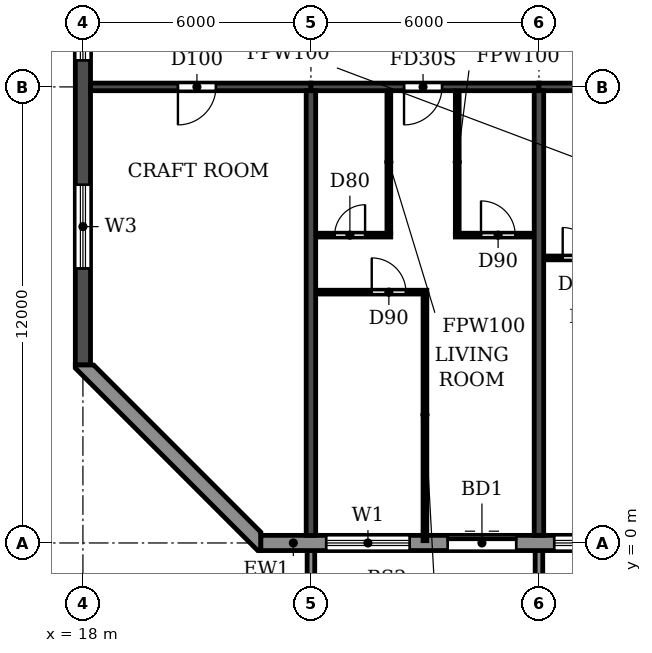
"""IFC4 building model, lengths in metres.
Left out: names, types, materials, properties, quantities, classifications, styles, units other than length and angle.
Written with IfcOpenShell. Run it as: python <this file> out.ifc"""

import sys

from ifc_helpers import new_model, si_unit, direction, frame, frame_2d, origin, place, context, subcontext, project, spatial, polyline, rectangle, outline, extrude, source, transform, mapped, element, fill, save


model = new_model("IFC4")
c1 = context("Model", 3, precision=1e-05, world=origin(), true_north=direction((0.0, 1.0)))
c2 = subcontext(c1, "Body", "Model", "MODEL_VIEW")
j1 = project(units=[si_unit("LENGTHUNIT", "METRE"), si_unit("PLANEANGLEUNIT", "RADIAN")], contexts=[c1])
p1 = place(None, origin())
s1 = spatial("IfcSite", under=j1, at=p1, CompositionType="ELEMENT")
p2 = place(p1, origin())
s2 = spatial("IfcBuilding", under=s1, at=p2, CompositionType="ELEMENT")
p3 = place(p2, frame((0.0, 0.0, 221.4)))
s3 = spatial("IfcBuildingStorey", under=s2, at=p3, CompositionType="ELEMENT", Elevation=221.4)
for number, where, z_axis, x_axis in (
    (1, (24.0, 0.2, 0.0), (0.0, 0.0, 1.0), (0.0, 1.0, 0.0)),
    (2, (30.0, 0.2, 0.0), (0.0, 0.0, 1.0), (0.0, 1.0, 0.0)),
):
    element("IfcWall", number, at=place(p3, frame(where, z_axis=z_axis, x_axis=x_axis)), inside=s3, PredefinedType="SHEAR", context=c2, shape_type="SweptSolid", body=[
        extrude(rectangle(XDim=11.7, YDim=0.25, at=frame_2d((5.85, 0.0))), origin(), (0.0, 0.0, 1.0), 3.08),
    ])
p4 = place(p3, frame((18.0, 4.683, 0.0), z_axis=(0.0, 0.0, 1.0), x_axis=(0.0, 1.0, 0.0)))
e3 = element("IfcWall", 3, at=p4, inside=s3, PredefinedType="SHEAR", context=c2, shape_type="SweptSolid", body=[
    extrude(rectangle(XDim=31.834, YDim=0.4, at=frame_2d((15.917, 0.0))), origin(), (0.0, 0.0, 1.0), 3.08),
])
p5 = place(p4, frame((23.817, 0.0, 0.9)))
e4 = element("IfcOpeningElement", 4, at=p5, cuts=e3, PredefinedType="OPENING", context=c2, shape_type="SweptSolid", body=[
    extrude(rectangle(XDim=1.2, YDim=1.5, at=frame_2d((0.6, 0.75))), frame((0.0, 0.21, 0.0), z_axis=(0.0, -1.0, 0.0), x_axis=(1.0, 0.0, 0.0)), (0.0, 0.0, 1.0), 0.42),
])
p6 = place(p4, frame((8.017, 0.0, 0.9)))
e5 = element("IfcOpeningElement", 5, at=p6, cuts=e3, PredefinedType="OPENING", context=c2, shape_type="SweptSolid", body=[
    extrude(rectangle(XDim=1.2, YDim=1.5, at=frame_2d((0.6, 0.75))), frame((0.0, 0.21, 0.0), z_axis=(0.0, -1.0, 0.0), x_axis=(1.0, 0.0, 0.0)), (0.0, 0.0, 1.0), 0.42),
])
p7 = place(p4, frame((27.694, 0.0, 0.6)))
e6 = element("IfcOpeningElement", 6, at=p7, cuts=e3, PredefinedType="OPENING", context=c2, shape_type="SweptSolid", body=[
    extrude(rectangle(XDim=2.2, YDim=1.8, at=frame_2d((1.1, 0.9))), frame((0.0, 0.21, 0.0), z_axis=(0.0, -1.0, 0.0), x_axis=(1.0, 0.0, 0.0)), (0.0, 0.0, 1.0), 0.42),
])
p8 = place(p4, frame((2.541, 0.0, 0.6)))
e7 = element("IfcOpeningElement", 7, at=p8, cuts=e3, PredefinedType="OPENING", context=c2, shape_type="SweptSolid", body=[
    extrude(rectangle(XDim=2.2, YDim=1.8, at=frame_2d((1.1, 0.9))), frame((0.0, 0.21, 0.0), z_axis=(0.0, -1.0, 0.0), x_axis=(1.0, 0.0, 0.0)), (0.0, 0.0, 1.0), 0.42),
])
p9 = place(p4, frame((15.917, 0.0, 0.9)))
e8 = element("IfcOpeningElement", 8, at=p9, cuts=e3, PredefinedType="OPENING", context=c2, shape_type="SweptSolid", body=[
    extrude(rectangle(XDim=1.2, YDim=1.5, at=frame_2d((0.6, 0.75))), frame((0.0, 0.21, 0.0), z_axis=(0.0, -1.0, 0.0), x_axis=(1.0, 0.0, 0.0)), (0.0, 0.0, 1.0), 0.42),
])
p10 = place(p3, frame((18.2, 12.0, 0.0), z_axis=(0.0, 0.0, 1.0), x_axis=(1.0, 0.0, 0.0)))
e9 = element("IfcWall", 9, at=p10, inside=s3, PredefinedType="SHEAR", context=c2, shape_type="SweptSolid", body=[
    extrude(rectangle(XDim=5.8, YDim=0.2, at=frame_2d((2.9, 0.0))), origin(), (0.0, 0.0, 1.0), 2.48),
])
p11 = place(p10, frame((2.3, 0.0, 0.0)))
e10 = element("IfcOpeningElement", 10, at=p11, cuts=e9, PredefinedType="OPENING", context=c2, shape_type="SweptSolid", body=[
    extrude(rectangle(XDim=1.0, YDim=2.1, at=frame_2d((0.5, 1.05))), frame((0.0, 0.11, 0.0), z_axis=(0.0, -1.0, 0.0), x_axis=(1.0, 0.0, 0.0)), (0.0, 0.0, 1.0), 0.22),
])
p12 = place(p3, frame((24.0, 12.0, 0.0), z_axis=(0.0, 0.0, 1.0), x_axis=(1.0, 0.0, 0.0)))
e11 = element("IfcWall", 11, at=p12, inside=s3, PredefinedType="SHEAR", context=c2, shape_type="SweptSolid", body=[
    extrude(rectangle(XDim=6.0, YDim=0.2, at=frame_2d((3.0, 0.0))), origin(), (0.0, 0.0, 1.0), 2.48),
])
p13 = place(p12, frame((2.45, 0.0, 0.0)))
e12 = element("IfcOpeningElement", 12, at=p13, cuts=e11, PredefinedType="OPENING", context=c2, shape_type="SweptSolid", body=[
    extrude(rectangle(XDim=1.0, YDim=2.1, at=frame_2d((0.5, 1.05))), frame((0.0, 0.11, 0.0), z_axis=(0.0, -1.0, 0.0), x_axis=(1.0, 0.0, 0.0)), (0.0, 0.0, 1.0), 0.22),
])
p14 = place(p3, frame((30.0, 12.0, 0.0), z_axis=(0.0, 0.0, 1.0), x_axis=(1.0, 0.0, 0.0)))
e13 = element("IfcWall", 13, at=p14, inside=s3, PredefinedType="SHEAR", context=c2, shape_type="SweptSolid", body=[
    extrude(rectangle(XDim=6.0, YDim=0.2, at=frame_2d((3.0, 0.0))), origin(), (0.0, 0.0, 1.0), 2.48),
])
p15 = place(p14, frame((2.45, 0.0, 0.0)))
e14 = element("IfcOpeningElement", 14, at=p15, cuts=e13, PredefinedType="OPENING", context=c2, shape_type="SweptSolid", body=[
    extrude(rectangle(XDim=1.0, YDim=2.1, at=frame_2d((0.5, 1.05))), frame((0.0, 0.11, 0.0), z_axis=(0.0, -1.0, 0.0), x_axis=(1.0, 0.0, 0.0)), (0.0, 0.0, 1.0), 0.22),
])
p16 = place(p3, frame((22.683, 0.0, 0.0), z_axis=(0.0, 0.0, 1.0), x_axis=(1.0, 0.0, 0.0)))
e15 = element("IfcWall", 15, at=p16, inside=s3, PredefinedType="STANDARD", context=c2, shape_type="SweptSolid", body=[
    extrude(rectangle(XDim=56.634, YDim=0.4, at=frame_2d((28.317, 0.0))), origin(), (0.0, 0.0, 1.0), 3.08),
])
p17 = place(p16, frame((1.717, 0.0, 0.9)))
e16 = element("IfcOpeningElement", 16, at=p17, cuts=e15, PredefinedType="OPENING", context=c2, shape_type="SweptSolid", body=[
    extrude(rectangle(XDim=2.2, YDim=1.5, at=frame_2d((1.1, 0.75))), frame((0.0, 0.21, 0.0), z_axis=(0.0, -1.0, 0.0), x_axis=(1.0, 0.0, 0.0)), (0.0, 0.0, 1.0), 0.42),
])
p18 = place(p16, frame((4.917, 0.0, 0.0)))
e17 = element("IfcOpeningElement", 17, at=p18, cuts=e15, PredefinedType="OPENING", context=c2, shape_type="SweptSolid", body=[
    extrude(rectangle(XDim=1.8, YDim=2.4, at=frame_2d((0.9, 1.2))), frame((0.0, 0.21, 0.0), z_axis=(0.0, -1.0, 0.0), x_axis=(1.0, 0.0, 0.0)), (0.0, 0.0, 1.0), 0.42),
])
p19 = place(p16, frame((7.717, 0.0, 0.9)))
e18 = element("IfcOpeningElement", 18, at=p19, cuts=e15, PredefinedType="OPENING", context=c2, shape_type="SweptSolid", body=[
    extrude(rectangle(XDim=2.2, YDim=1.5, at=frame_2d((1.1, 0.75))), frame((0.0, 0.21, 0.0), z_axis=(0.0, -1.0, 0.0), x_axis=(1.0, 0.0, 0.0)), (0.0, 0.0, 1.0), 0.42),
])
p20 = place(p16, frame((10.717, 0.0, 0.9)))
e19 = element("IfcOpeningElement", 19, at=p20, cuts=e15, PredefinedType="OPENING", context=c2, shape_type="SweptSolid", body=[
    extrude(rectangle(XDim=2.2, YDim=1.5, at=frame_2d((1.1, 0.75))), frame((0.0, 0.21, 0.0), z_axis=(0.0, -1.0, 0.0), x_axis=(1.0, 0.0, 0.0)), (0.0, 0.0, 1.0), 0.42),
])
p21 = place(p16, frame((13.717, 0.0, 0.9)))
e20 = element("IfcOpeningElement", 20, at=p21, cuts=e15, PredefinedType="OPENING", context=c2, shape_type="SweptSolid", body=[
    extrude(rectangle(XDim=2.2, YDim=1.5, at=frame_2d((1.1, 0.75))), frame((0.0, 0.21, 0.0), z_axis=(0.0, -1.0, 0.0), x_axis=(1.0, 0.0, 0.0)), (0.0, 0.0, 1.0), 0.42),
])
p22 = place(p16, frame((16.917, 0.0, 0.0)))
e21 = element("IfcOpeningElement", 21, at=p22, cuts=e15, PredefinedType="OPENING", context=c2, shape_type="SweptSolid", body=[
    extrude(rectangle(XDim=1.8, YDim=2.4, at=frame_2d((0.9, 1.2))), frame((0.0, 0.21, 0.0), z_axis=(0.0, -1.0, 0.0), x_axis=(1.0, 0.0, 0.0)), (0.0, 0.0, 1.0), 0.42),
])
p23 = place(p16, frame((19.717, 0.0, 0.9)))
e22 = element("IfcOpeningElement", 22, at=p23, cuts=e15, PredefinedType="OPENING", context=c2, shape_type="SweptSolid", body=[
    extrude(rectangle(XDim=2.2, YDim=1.5, at=frame_2d((1.1, 0.75))), frame((0.0, 0.21, 0.0), z_axis=(0.0, -1.0, 0.0), x_axis=(1.0, 0.0, 0.0)), (0.0, 0.0, 1.0), 0.42),
])
p24 = place(p16, frame((22.717, 0.0, 0.9)))
e23 = element("IfcOpeningElement", 23, at=p24, cuts=e15, PredefinedType="OPENING", context=c2, shape_type="SweptSolid", body=[
    extrude(rectangle(XDim=2.2, YDim=1.5, at=frame_2d((1.1, 0.75))), frame((0.0, 0.21, 0.0), z_axis=(0.0, -1.0, 0.0), x_axis=(1.0, 0.0, 0.0)), (0.0, 0.0, 1.0), 0.42),
])
p25 = place(p16, frame((25.917, 0.0, 0.0)))
e24 = element("IfcOpeningElement", 24, at=p25, cuts=e15, PredefinedType="OPENING", context=c2, shape_type="SweptSolid", body=[
    extrude(rectangle(XDim=1.8, YDim=2.4, at=frame_2d((0.9, 1.2))), frame((0.0, 0.21, 0.0), z_axis=(0.0, -1.0, 0.0), x_axis=(1.0, 0.0, 0.0)), (0.0, 0.0, 1.0), 0.42),
])
p26 = place(p16, frame((28.717, 0.0, 0.9)))
e25 = element("IfcOpeningElement", 25, at=p26, cuts=e15, PredefinedType="OPENING", context=c2, shape_type="SweptSolid", body=[
    extrude(rectangle(XDim=2.2, YDim=1.5, at=frame_2d((1.1, 0.75))), frame((0.0, 0.21, 0.0), z_axis=(0.0, -1.0, 0.0), x_axis=(1.0, 0.0, 0.0)), (0.0, 0.0, 1.0), 0.42),
])
p27 = place(p16, frame((31.717, 0.0, 0.9)))
e26 = element("IfcOpeningElement", 26, at=p27, cuts=e15, PredefinedType="OPENING", context=c2, shape_type="SweptSolid", body=[
    extrude(rectangle(XDim=2.2, YDim=1.5, at=frame_2d((1.1, 0.75))), frame((0.0, 0.21, 0.0), z_axis=(0.0, -1.0, 0.0), x_axis=(1.0, 0.0, 0.0)), (0.0, 0.0, 1.0), 0.42),
])
p28 = place(p16, frame((34.717, 0.0, 0.9)))
e27 = element("IfcOpeningElement", 27, at=p28, cuts=e15, PredefinedType="OPENING", context=c2, shape_type="SweptSolid", body=[
    extrude(rectangle(XDim=2.2, YDim=1.5, at=frame_2d((1.1, 0.75))), frame((0.0, 0.21, 0.0), z_axis=(0.0, -1.0, 0.0), x_axis=(1.0, 0.0, 0.0)), (0.0, 0.0, 1.0), 0.42),
])
p29 = place(p16, frame((37.917, 0.0, 0.0)))
e28 = element("IfcOpeningElement", 28, at=p29, cuts=e15, PredefinedType="OPENING", context=c2, shape_type="SweptSolid", body=[
    extrude(rectangle(XDim=1.8, YDim=2.4, at=frame_2d((0.9, 1.2))), frame((0.0, 0.21, 0.0), z_axis=(0.0, -1.0, 0.0), x_axis=(1.0, 0.0, 0.0)), (0.0, 0.0, 1.0), 0.42),
])
p30 = place(p16, frame((40.717, 0.0, 0.9)))
e29 = element("IfcOpeningElement", 29, at=p30, cuts=e15, PredefinedType="OPENING", context=c2, shape_type="SweptSolid", body=[
    extrude(rectangle(XDim=2.2, YDim=1.5, at=frame_2d((1.1, 0.75))), frame((0.0, 0.21, 0.0), z_axis=(0.0, -1.0, 0.0), x_axis=(1.0, 0.0, 0.0)), (0.0, 0.0, 1.0), 0.42),
])
p31 = place(p16, frame((43.717, 0.0, 0.9)))
e30 = element("IfcOpeningElement", 30, at=p31, cuts=e15, PredefinedType="OPENING", context=c2, shape_type="SweptSolid", body=[
    extrude(rectangle(XDim=2.2, YDim=1.5, at=frame_2d((1.1, 0.75))), frame((0.0, 0.21, 0.0), z_axis=(0.0, -1.0, 0.0), x_axis=(1.0, 0.0, 0.0)), (0.0, 0.0, 1.0), 0.42),
])
p32 = place(p16, frame((46.717, 0.0, 0.9)))
e31 = element("IfcOpeningElement", 31, at=p32, cuts=e15, PredefinedType="OPENING", context=c2, shape_type="SweptSolid", body=[
    extrude(rectangle(XDim=2.2, YDim=1.5, at=frame_2d((1.1, 0.75))), frame((0.0, 0.21, 0.0), z_axis=(0.0, -1.0, 0.0), x_axis=(1.0, 0.0, 0.0)), (0.0, 0.0, 1.0), 0.42),
])
p33 = place(p16, frame((49.917, 0.0, 0.0)))
e32 = element("IfcOpeningElement", 32, at=p33, cuts=e15, PredefinedType="OPENING", context=c2, shape_type="SweptSolid", body=[
    extrude(rectangle(XDim=1.8, YDim=2.4, at=frame_2d((0.9, 1.2))), frame((0.0, 0.21, 0.0), z_axis=(0.0, -1.0, 0.0), x_axis=(1.0, 0.0, 0.0)), (0.0, 0.0, 1.0), 0.42),
])
p34 = place(p16, frame((52.717, 0.0, 0.9)))
e33 = element("IfcOpeningElement", 33, at=p34, cuts=e15, PredefinedType="OPENING", context=c2, shape_type="SweptSolid", body=[
    extrude(rectangle(XDim=2.2, YDim=1.5, at=frame_2d((1.1, 0.75))), frame((0.0, 0.21, 0.0), z_axis=(0.0, -1.0, 0.0), x_axis=(1.0, 0.0, 0.0)), (0.0, 0.0, 1.0), 0.42),
])
p35 = place(p3, origin())
e34 = element("IfcWall", 34, at=p35, inside=s3, PredefinedType="STANDARD", context=c2, shape_type="SweptSolid", body=[
    extrude(outline(polyline([(17.8, 4.683), (17.8, 4.6), (22.6, -0.2), (22.683, -0.2), (22.683, 0.283), (18.283, 4.683), (17.8, 4.683)])), origin(), (0.0, 0.0, 1.0), 3.08),
])
m1 = source(origin(), c2, "Body", "SweptSolid", [
    extrude(outline(polyline([(0.0, 0.0), (0.2, 0.0), (0.2, 1.65), (0.0, 1.65), (0.0, 0.0)])), origin(), (0.0, 0.0, 1.0), 3.1),
])
for number, where in (
    (35, (23.9, -1.85, 0.0)),
    (36, (29.9, -1.85, 0.0)),
):
    element("IfcWall", number, at=place(p3, frame(where)), inside=s3, PredefinedType="STANDARD", context=c2, shape_type="MappedRepresentation", body=[
        mapped(m1, transform((0.0, 0.0, 0.0))),
    ])
p36 = place(p3, frame((24.135, 6.6, 0.0), z_axis=(0.0, 0.0, 1.0), x_axis=(1.0, 0.0, 0.0)))
e37 = element("IfcWall", 37, at=p36, inside=s3, PredefinedType="PARTITIONING", context=c2, shape_type="SweptSolid", body=[
    extrude(rectangle(XDim=2.915, YDim=0.1, at=frame_2d((1.458, 0.0))), origin(), (0.0, 0.0, 1.0), 3.08),
])
p37 = place(p36, frame((1.465, 0.0, 0.0)))
e38 = element("IfcOpeningElement", 38, at=p37, cuts=e37, PredefinedType="OPENING", context=c2, shape_type="SweptSolid", body=[
    extrude(rectangle(XDim=0.9, YDim=2.1, at=frame_2d((0.45, 1.05))), frame((0.0, 0.06, 0.0), z_axis=(0.0, -1.0, 0.0), x_axis=(1.0, 0.0, 0.0)), (0.0, 0.0, 1.0), 0.12),
])
p38 = place(p3, frame((30.135, 7.5, 0.0), z_axis=(0.0, 0.0, 1.0), x_axis=(1.0, 0.0, 0.0)))
e39 = element("IfcWall", 39, at=p38, inside=s3, PredefinedType="PARTITIONING", context=c2, shape_type="SweptSolid", body=[
    extrude(rectangle(XDim=1.965, YDim=0.1, at=frame_2d((0.982, 0.0))), origin(), (0.0, 0.0, 1.0), 3.08),
])
p39 = place(p38, frame((0.49, 0.0, 0.0)))
e40 = element("IfcOpeningElement", 40, at=p39, cuts=e39, PredefinedType="OPENING", context=c2, shape_type="SweptSolid", body=[
    extrude(rectangle(XDim=0.8, YDim=2.1, at=frame_2d((0.4, 1.05))), frame((0.0, 0.06, 0.0), z_axis=(0.0, -1.0, 0.0), x_axis=(1.0, 0.0, 0.0)), (0.0, 0.0, 1.0), 0.12),
])
p40 = place(p3, frame((24.135, 8.1, 0.0), z_axis=(0.0, 0.0, 1.0), x_axis=(1.0, 0.0, 0.0)))
e41 = element("IfcWall", 41, at=p40, inside=s3, PredefinedType="PARTITIONING", context=c2, shape_type="SweptSolid", body=[
    extrude(rectangle(XDim=1.965, YDim=0.1, at=frame_2d((0.982, 0.0))), origin(), (0.0, 0.0, 1.0), 3.08),
])
p41 = place(p40, frame((0.49, 0.0, 0.0)))
e42 = element("IfcOpeningElement", 42, at=p41, cuts=e41, PredefinedType="OPENING", context=c2, shape_type="SweptSolid", body=[
    extrude(rectangle(XDim=0.8, YDim=2.1, at=frame_2d((0.4, 1.05))), frame((0.0, 0.06, 0.0), z_axis=(0.0, -1.0, 0.0), x_axis=(1.0, 0.0, 0.0)), (0.0, 0.0, 1.0), 0.12),
])
p42 = place(p3, frame((27.8, 8.1, 0.0), z_axis=(0.0, 0.0, 1.0), x_axis=(1.0, 0.0, 0.0)))
e43 = element("IfcWall", 43, at=p42, inside=s3, PredefinedType="PARTITIONING", context=c2, shape_type="SweptSolid", body=[
    extrude(rectangle(XDim=2.065, YDim=0.1, at=frame_2d((1.032, 0.0))), origin(), (0.0, 0.0, 1.0), 3.08),
])
p43 = place(p42, frame((0.675, 0.0, 0.0)))
e44 = element("IfcOpeningElement", 44, at=p43, cuts=e43, PredefinedType="OPENING", context=c2, shape_type="SweptSolid", body=[
    extrude(rectangle(XDim=0.9, YDim=2.1, at=frame_2d((0.45, 1.05))), frame((0.0, 0.06, 0.0), z_axis=(0.0, -1.0, 0.0), x_axis=(1.0, 0.0, 0.0)), (0.0, 0.0, 1.0), 0.12),
])
p44 = place(p3, frame((26.05, 8.15, 0.0), z_axis=(0.0, 0.0, 1.0), x_axis=(0.0, 1.0, 0.0)))
e45 = element("IfcWall", 45, at=p44, inside=s3, PredefinedType="PARTITIONING", context=c2, shape_type="SweptSolid", body=[
    extrude(rectangle(XDim=3.74, YDim=0.1, at=frame_2d((1.87, 0.0))), origin(), (0.0, 0.0, 1.0), 3.08),
])
p45 = place(p3, frame((27.0, 0.06, 0.0), z_axis=(0.0, 0.0, 1.0), x_axis=(0.0, 1.0, 0.0)))
e46 = element("IfcWall", 46, at=p45, inside=s3, PredefinedType="PARTITIONING", context=c2, shape_type="SweptSolid", body=[
    extrude(rectangle(XDim=6.49, YDim=0.1, at=frame_2d((3.245, 0.0))), origin(), (0.0, 0.0, 1.0), 3.08),
])
p46 = place(p3, frame((27.85, 8.15, 0.0), z_axis=(0.0, 0.0, 1.0), x_axis=(0.0, 1.0, 0.0)))
e47 = element("IfcWall", 47, at=p46, inside=s3, PredefinedType="PARTITIONING", context=c2, shape_type="SweptSolid", body=[
    extrude(rectangle(XDim=3.74, YDim=0.1, at=frame_2d((1.87, 0.0))), origin(), (0.0, 0.0, 1.0), 3.08),
])
p47 = place(p17, origin())
e48 = element("IfcWindow", 48, at=p47, inside=s3, PartitioningType="DOUBLE_PANEL_HORIZONTAL", PredefinedType="WINDOW", context=c2, shape_type="SweptSolid", body=[
    extrude(rectangle(XDim=2.2, YDim=1.5, at=frame_2d((1.1, 0.75))), frame((0.0, 0.03, 0.0), z_axis=(0.0, -1.0, 0.0), x_axis=(1.0, 0.0, 0.0)), (0.0, 0.0, 1.0), 0.06),
])
fill(e16, e48)
p48 = place(p18, origin())
e49 = element("IfcDoor", 49, at=p48, inside=s3, OperationType="DOUBLE_DOOR_SLIDING", PredefinedType="DOOR", context=c2, shape_type="SweptSolid", body=[
    extrude(rectangle(XDim=1.8, YDim=2.4, at=frame_2d((0.9, 1.2))), frame((0.0, 0.025, 0.0), z_axis=(0.0, -1.0, 0.0), x_axis=(1.0, 0.0, 0.0)), (0.0, 0.0, 1.0), 0.05),
])
fill(e17, e49)
p49 = place(p19, origin())
e50 = element("IfcWindow", 50, at=p49, inside=s3, PartitioningType="DOUBLE_PANEL_HORIZONTAL", PredefinedType="WINDOW", context=c2, shape_type="SweptSolid", body=[
    extrude(rectangle(XDim=2.2, YDim=1.5, at=frame_2d((1.1, 0.75))), frame((0.0, 0.03, 0.0), z_axis=(0.0, -1.0, 0.0), x_axis=(1.0, 0.0, 0.0)), (0.0, 0.0, 1.0), 0.06),
])
fill(e18, e50)
p50 = place(p6, origin())
e51 = element("IfcWindow", 51, at=p50, inside=s3, PartitioningType="SINGLE_PANEL", PredefinedType="WINDOW", context=c2, shape_type="SweptSolid", body=[
    extrude(rectangle(XDim=1.2, YDim=1.5, at=frame_2d((0.6, 0.75))), frame((0.0, 0.03, 0.0), z_axis=(0.0, -1.0, 0.0), x_axis=(1.0, 0.0, 0.0)), (0.0, 0.0, 1.0), 0.06),
])
fill(e5, e51)
p51 = place(p8, origin())
e52 = element("IfcWindow", 52, at=p51, inside=s3, PartitioningType="DOUBLE_PANEL_HORIZONTAL", PredefinedType="WINDOW", context=c2, shape_type="SweptSolid", body=[
    extrude(rectangle(XDim=2.2, YDim=1.8, at=frame_2d((1.1, 0.9))), frame((0.0, 0.03, 0.0), z_axis=(0.0, -1.0, 0.0), x_axis=(1.0, 0.0, 0.0)), (0.0, 0.0, 1.0), 0.06),
])
fill(e7, e52)
p52 = place(p11, frame((1.0, 0.0, 0.0), z_axis=(0.0, 0.0, 1.0), x_axis=(-1.0, 0.0, 0.0)))
e53 = element("IfcDoor", 53, at=p52, inside=s3, OperationType="SINGLE_SWING_RIGHT", PredefinedType="DOOR", context=c2, shape_type="SweptSolid", body=[
    extrude(rectangle(XDim=1.0, YDim=2.1, at=frame_2d((0.5, 1.05))), frame((0.0, 0.025, 0.0), z_axis=(0.0, -1.0, 0.0), x_axis=(1.0, 0.0, 0.0)), (0.0, 0.0, 1.0), 0.05),
])
fill(e10, e53)
p53 = place(p41, origin())
e54 = element("IfcDoor", 54, at=p53, inside=s3, OperationType="SINGLE_SWING_RIGHT", PredefinedType="DOOR", context=c2, shape_type="SweptSolid", body=[
    extrude(rectangle(XDim=0.8, YDim=2.1, at=frame_2d((0.4, 1.05))), frame((0.0, 0.025, 0.0), z_axis=(0.0, -1.0, 0.0), x_axis=(1.0, 0.0, 0.0)), (0.0, 0.0, 1.0), 0.05),
])
fill(e42, e54)
p54 = place(p37, origin())
e55 = element("IfcDoor", 55, at=p54, inside=s3, OperationType="SINGLE_SWING_LEFT", PredefinedType="DOOR", context=c2, shape_type="SweptSolid", body=[
    extrude(rectangle(XDim=0.9, YDim=2.1, at=frame_2d((0.45, 1.05))), frame((0.0, 0.025, 0.0), z_axis=(0.0, -1.0, 0.0), x_axis=(1.0, 0.0, 0.0)), (0.0, 0.0, 1.0), 0.05),
])
fill(e38, e55)
p55 = place(p13, frame((1.0, 0.0, 0.0), z_axis=(0.0, 0.0, 1.0), x_axis=(-1.0, 0.0, 0.0)))
e56 = element("IfcDoor", 56, at=p55, inside=s3, OperationType="SINGLE_SWING_RIGHT", PredefinedType="DOOR", context=c2, shape_type="SweptSolid", body=[
    extrude(rectangle(XDim=1.0, YDim=2.1, at=frame_2d((0.5, 1.05))), frame((0.0, 0.025, 0.0), z_axis=(0.0, -1.0, 0.0), x_axis=(1.0, 0.0, 0.0)), (0.0, 0.0, 1.0), 0.05),
])
fill(e12, e56)
p56 = place(p43, origin())
e57 = element("IfcDoor", 57, at=p56, inside=s3, OperationType="SINGLE_SWING_LEFT", PredefinedType="DOOR", context=c2, shape_type="SweptSolid", body=[
    extrude(rectangle(XDim=0.9, YDim=2.1, at=frame_2d((0.45, 1.05))), frame((0.0, 0.025, 0.0), z_axis=(0.0, -1.0, 0.0), x_axis=(1.0, 0.0, 0.0)), (0.0, 0.0, 1.0), 0.05),
])
fill(e44, e57)
p57 = place(p39, origin())
e58 = element("IfcDoor", 58, at=p57, inside=s3, OperationType="SINGLE_SWING_LEFT", PredefinedType="DOOR", context=c2, shape_type="SweptSolid", body=[
    extrude(rectangle(XDim=0.8, YDim=2.1, at=frame_2d((0.4, 1.05))), frame((0.0, 0.025, 0.0), z_axis=(0.0, -1.0, 0.0), x_axis=(1.0, 0.0, 0.0)), (0.0, 0.0, 1.0), 0.05),
])
fill(e40, e58)
save(model, sys.argv[1])
